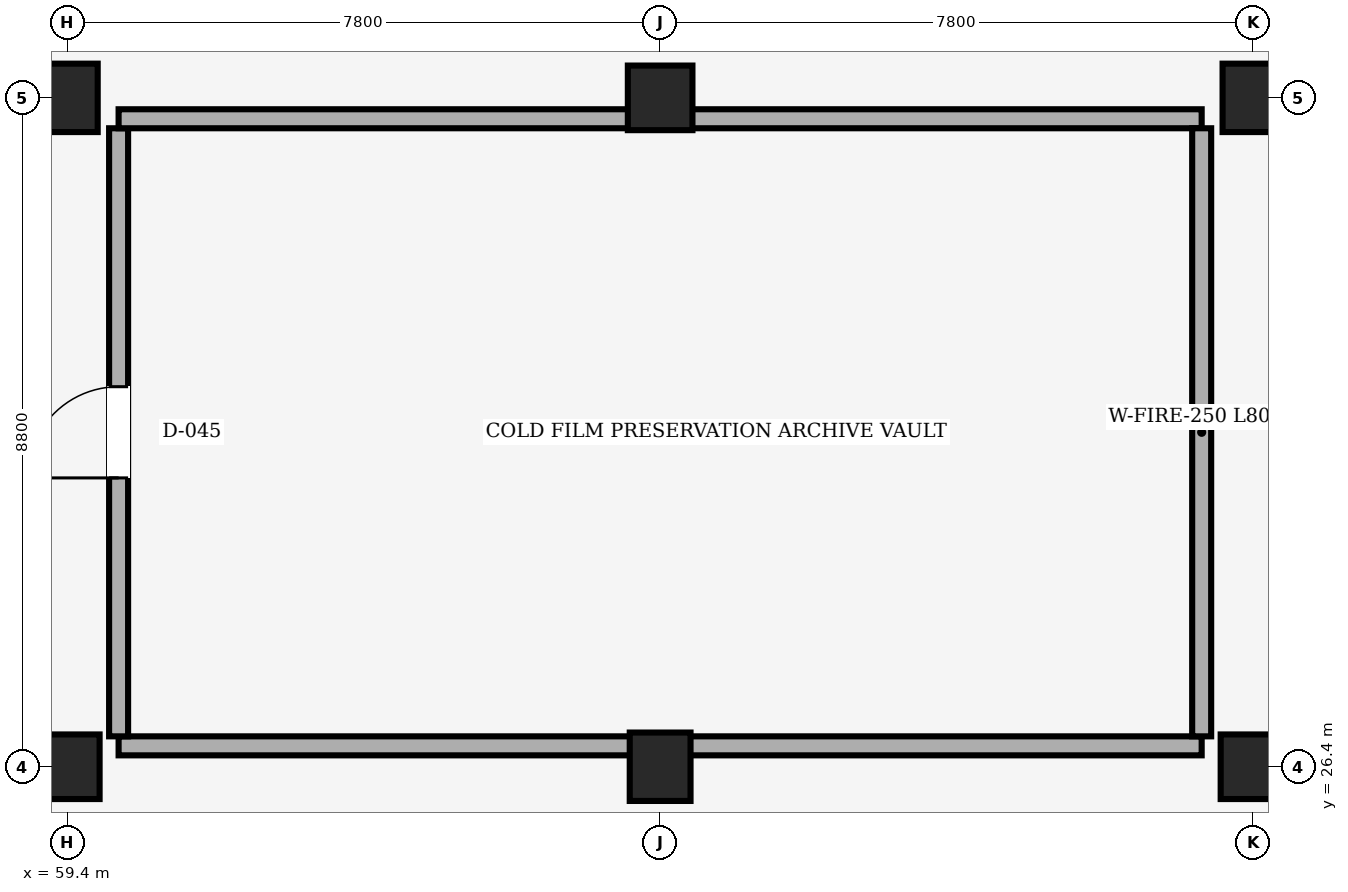
"""IFC4 building model, lengths in metres.
Left out: names, types, materials, properties, quantities, classifications, styles, units other than length and angle.
Written with IfcOpenShell. Run it as: python <this file> out.ifc"""

import sys

from ifc_helpers import new_model, si_unit, direction, frame, frame_2d, origin, origin_2d, place, context, subcontext, project, spatial, rectangle, extrude, element, fill, save


model = new_model("IFC4")
c1 = context("Model", 3, precision=1e-05, world=origin(), true_north=direction((0.0, 1.0)))
c2 = subcontext(c1, "Body", "Model", "MODEL_VIEW")
j1 = project(units=[si_unit("LENGTHUNIT", "METRE"), si_unit("PLANEANGLEUNIT", "RADIAN")], contexts=[c1])
p1 = place(None, origin())
s1 = spatial("IfcSite", under=j1, at=p1, CompositionType="ELEMENT")
p2 = place(p1, origin())
s2 = spatial("IfcBuilding", under=s1, at=p2, CompositionType="ELEMENT")
p3 = place(p2, frame((0.0, 0.0, -4.2)))
s3 = spatial("IfcBuildingStorey", under=s2, at=p3, CompositionType="ELEMENT", Elevation=-4.2)
p4 = place(p3, frame((59.4, 26.4, 0.0), z_axis=(0.0, 0.0, 1.0), x_axis=(1.0, 0.0, 0.0)))
e1 = element("IfcColumn", 1, at=p4, inside=s3, PredefinedType="COLUMN", context=c2, shape_type="SweptSolid", body=[
    extrude(rectangle(XDim=0.85, YDim=0.85, at=origin_2d()), origin(), (0.0, 0.0, 1.0), 3.92),
])
for number, where, z_axis, x_axis in (
    (2, (59.4, 35.2, 0.0), (0.0, 0.0, 1.0), (1.0, 0.0, 0.0)),
    (3, (67.2, 26.4, 0.0), (0.0, 0.0, 1.0), (1.0, 0.0, 0.0)),
):
    element("IfcColumn", number, at=place(p3, frame(where, z_axis=z_axis, x_axis=x_axis)), inside=s3, PredefinedType="COLUMN", context=c2, shape_type="SweptSolid", body=[
        extrude(rectangle(XDim=0.8, YDim=0.9, at=origin_2d()), origin(), (0.0, 0.0, 1.0), 3.92),
    ])
for number, where, z_axis, x_axis in (
    (4, (67.2, 35.2, 0.0), (0.0, 0.0, 1.0), (1.0, 0.0, 0.0)),
    (5, (75.0, 26.4, 0.0), (0.0, 0.0, 1.0), (1.0, 0.0, 0.0)),
):
    element("IfcColumn", number, at=place(p3, frame(where, z_axis=z_axis, x_axis=x_axis)), inside=s3, PredefinedType="COLUMN", context=c2, shape_type="SweptSolid", body=[
        extrude(rectangle(XDim=0.85, YDim=0.85, at=origin_2d()), origin(), (0.0, 0.0, 1.0), 3.92),
    ])
p5 = place(p3, frame((75.0, 35.2, 0.0), z_axis=(0.0, 0.0, 1.0), x_axis=(1.0, 0.0, 0.0)))
e6 = element("IfcColumn", 6, at=p5, inside=s3, PredefinedType="COLUMN", context=c2, shape_type="SweptSolid", body=[
    extrude(rectangle(XDim=0.8, YDim=0.9, at=origin_2d()), origin(), (0.0, 0.0, 1.0), 3.92),
])
p6 = place(p3, frame((74.325, 26.675, 0.0), z_axis=(0.0, 0.0, 1.0), x_axis=(-1.0, 0.0, 0.0)))
e7 = element("IfcWall", 7, at=p6, inside=s3, PredefinedType="SOLIDWALL", context=c2, shape_type="SweptSolid", body=[
    extrude(rectangle(XDim=14.25, YDim=0.25, at=frame_2d((7.125, 0.0))), origin(), (0.0, 0.0, 1.0), 3.05),
])
p7 = place(p3, frame((60.075, 26.8, 0.0), z_axis=(0.0, 0.0, 1.0), x_axis=(0.0, 1.0, 0.0)))
e8 = element("IfcWall", 8, at=p7, inside=s3, PredefinedType="SOLIDWALL", context=c2, shape_type="SweptSolid", body=[
    extrude(rectangle(XDim=8.0, YDim=0.25, at=frame_2d((4.0, 0.0))), origin(), (0.0, 0.0, 1.0), 3.9),
])
p8 = place(p7, frame((3.4, 0.0, 0.0)))
e9 = element("IfcOpeningElement", 9, at=p8, cuts=e8, PredefinedType="OPENING", context=c2, shape_type="SweptSolid", body=[
    extrude(rectangle(XDim=1.2, YDim=2.15, at=frame_2d((0.6, 1.075))), frame((0.0, 0.125, 0.0), z_axis=(0.0, -1.0, 0.0), x_axis=(1.0, 0.0, 0.0)), (0.0, 0.0, 1.0), 0.25),
])
p9 = place(p3, frame((60.075, 34.925, 0.0), z_axis=(0.0, 0.0, 1.0), x_axis=(1.0, 0.0, 0.0)))
e10 = element("IfcWall", 10, at=p9, inside=s3, PredefinedType="SOLIDWALL", context=c2, shape_type="SweptSolid", body=[
    extrude(rectangle(XDim=14.25, YDim=0.25, at=frame_2d((7.125, 0.0))), origin(), (0.0, 0.0, 1.0), 3.0),
])
p10 = place(p3, frame((74.325, 34.8, 0.0), z_axis=(0.0, 0.0, 1.0), x_axis=(0.0, -1.0, 0.0)))
e11 = element("IfcWall", 11, at=p10, inside=s3, PredefinedType="SOLIDWALL", context=c2, shape_type="SweptSolid", body=[
    extrude(rectangle(XDim=8.0, YDim=0.25, at=frame_2d((4.0, 0.0))), origin(), (0.0, 0.0, 1.0), 3.9),
])
p11 = place(p8, origin())
e12 = element("IfcDoor", 12, at=p11, inside=s3, OperationType="SINGLE_SWING_LEFT", PredefinedType="DOOR", context=c2, shape_type="SweptSolid", body=[
    extrude(rectangle(XDim=1.2, YDim=2.15, at=frame_2d((0.6, 1.075))), frame((0.0, 0.025, 0.0), z_axis=(0.0, -1.0, 0.0), x_axis=(1.0, 0.0, 0.0)), (0.0, 0.0, 1.0), 0.05),
])
fill(e9, e12)
save(model, sys.argv[1])
